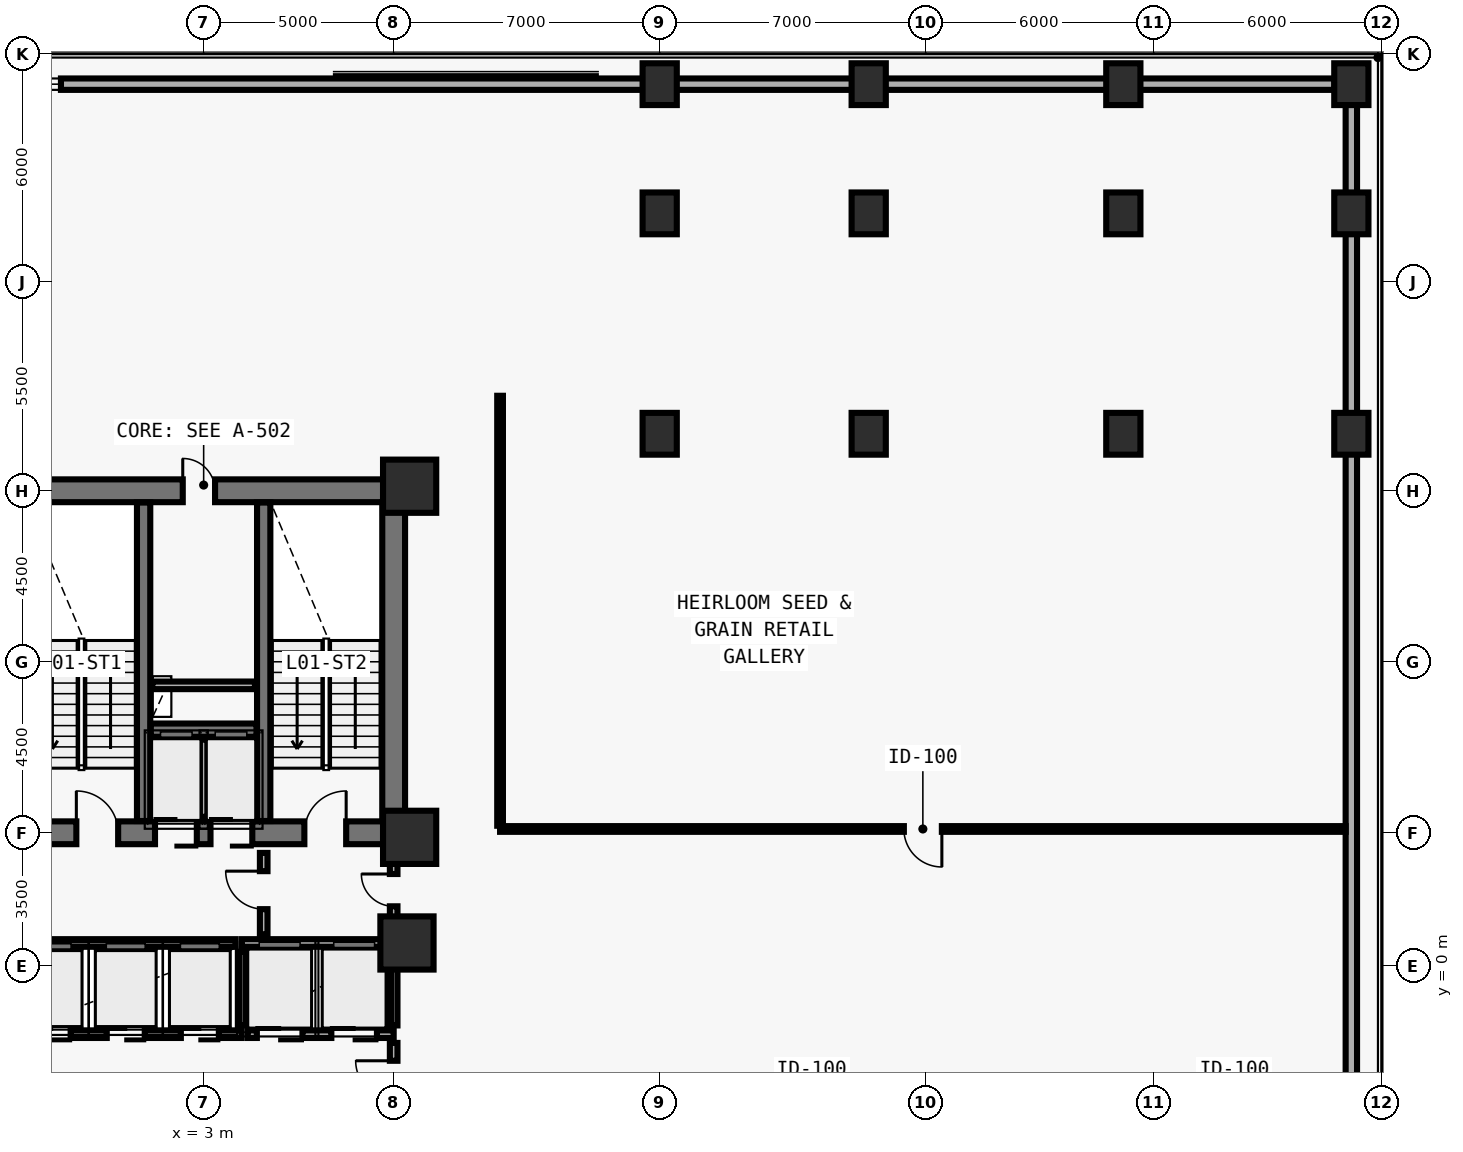
"""IFC4 building model, lengths in metres.
Left out: names, types, materials, properties, quantities, classifications, styles, units other than length and angle.
Written with IfcOpenShell. Run it as: python <this file> out.ifc"""

import sys

from ifc_helpers import new_model, si_unit, direction, frame, frame_2d, origin, origin_2d, place, context, subcontext, project, spatial, rectangle, extrude, element, fill, save


model = new_model("IFC4")
c1 = context("Model", 3, precision=1e-05, world=origin(), true_north=direction((0.0, 1.0)))
c2 = subcontext(c1, "Body", "Model", "MODEL_VIEW")
j1 = project(units=[si_unit("LENGTHUNIT", "METRE"), si_unit("PLANEANGLEUNIT", "RADIAN")], contexts=[c1])
p1 = place(None, origin())
s1 = spatial("IfcSite", under=j1, at=p1, CompositionType="ELEMENT")
p2 = place(p1, origin())
s2 = spatial("IfcBuilding", under=s1, at=p2, CompositionType="ELEMENT")
p3 = place(p2, frame((0.0, 0.0, 4.6)))
s3 = spatial("IfcBuildingStorey", under=s2, at=p3, CompositionType="ELEMENT", Elevation=4.6)
p4 = place(p3, frame((-2.0, 3.5, 0.0), z_axis=(0.0, 0.0, 1.0), x_axis=(1.0, 0.0, 0.0)))
e1 = element("IfcWall", 1, at=p4, inside=s3, PredefinedType="SHEAR", context=c2, shape_type="SweptSolid", body=[
    extrude(rectangle(XDim=10.0, YDim=0.6, at=frame_2d((5.0, 0.0))), origin(), (0.0, 0.0, 1.0), 4.592),
])
p5 = place(p4, frame((1.65, 0.0, 0.0)))
e2 = element("IfcOpeningElement", 2, at=p5, cuts=e1, PredefinedType="OPENING", context=c2, shape_type="SweptSolid", body=[
    extrude(rectangle(XDim=1.1, YDim=2.15, at=frame_2d((0.55, 1.075))), frame((0.0, 0.31, 0.0), z_axis=(0.0, -1.0, 0.0), x_axis=(1.0, 0.0, 0.0)), (0.0, 0.0, 1.0), 0.62),
])
p6 = place(p4, frame((7.65, 0.0, 0.0)))
e3 = element("IfcOpeningElement", 3, at=p6, cuts=e1, PredefinedType="OPENING", context=c2, shape_type="SweptSolid", body=[
    extrude(rectangle(XDim=1.1, YDim=2.15, at=frame_2d((0.55, 1.075))), frame((0.0, 0.31, 0.0), z_axis=(0.0, -1.0, 0.0), x_axis=(1.0, 0.0, 0.0)), (0.0, 0.0, 1.0), 0.62),
])
p7 = place(p4, frame((3.72, 0.0, 0.0)))
e4 = element("IfcOpeningElement", 4, at=p7, cuts=e1, PredefinedType="OPENING", context=c2, shape_type="SweptSolid", body=[
    extrude(rectangle(XDim=1.1, YDim=2.2, at=frame_2d((0.55, 1.1))), frame((0.0, 0.31, 0.0), z_axis=(0.0, -1.0, 0.0), x_axis=(1.0, 0.0, 0.0)), (0.0, 0.0, 1.0), 0.62),
])
p8 = place(p4, frame((5.18, 0.0, 0.0)))
e5 = element("IfcOpeningElement", 5, at=p8, cuts=e1, PredefinedType="OPENING", context=c2, shape_type="SweptSolid", body=[
    extrude(rectangle(XDim=1.1, YDim=2.2, at=frame_2d((0.55, 1.1))), frame((0.0, 0.31, 0.0), z_axis=(0.0, -1.0, 0.0), x_axis=(1.0, 0.0, 0.0)), (0.0, 0.0, 1.0), 0.62),
])
p9 = place(p3, frame((-2.0, 12.5, 0.0), z_axis=(0.0, 0.0, 1.0), x_axis=(1.0, 0.0, 0.0)))
e6 = element("IfcWall", 6, at=p9, inside=s3, PredefinedType="SHEAR", context=c2, shape_type="SweptSolid", body=[
    extrude(rectangle(XDim=10.0, YDim=0.6, at=frame_2d((5.0, 0.0))), origin(), (0.0, 0.0, 1.0), 4.592),
])
p10 = place(p9, frame((4.45, 0.0, 0.0)))
e7 = element("IfcOpeningElement", 7, at=p10, cuts=e6, PredefinedType="OPENING", context=c2, shape_type="SweptSolid", body=[
    extrude(rectangle(XDim=0.85, YDim=2.1, at=frame_2d((0.425, 1.05))), frame((0.0, 0.31, 0.0), z_axis=(0.0, -1.0, 0.0), x_axis=(1.0, 0.0, 0.0)), (0.0, 0.0, 1.0), 0.62),
])
p11 = place(p3, frame((8.0, 3.81, 0.0), z_axis=(0.0, 0.0, 1.0), x_axis=(0.0, 1.0, 0.0)))
e8 = element("IfcWall", 8, at=p11, inside=s3, PredefinedType="SHEAR", context=c2, shape_type="SweptSolid", body=[
    extrude(rectangle(XDim=8.38, YDim=0.6, at=frame_2d((4.19, 0.0))), origin(), (0.0, 0.0, 1.0), 4.592),
])
for number, where, z_axis, x_axis in (
    (9, (1.42, 3.81, 0.0), (0.0, 0.0, 1.0), (0.0, 1.0, 0.0)),
    (10, (4.58, 3.81, 0.0), (0.0, 0.0, 1.0), (0.0, 1.0, 0.0)),
):
    element("IfcWall", number, at=place(p3, frame(where, z_axis=z_axis, x_axis=x_axis)), inside=s3, PredefinedType="SHEAR", context=c2, shape_type="SweptSolid", body=[
        extrude(rectangle(XDim=8.38, YDim=0.35, at=frame_2d((4.19, 0.0))), origin(), (0.0, 0.0, 1.0), 4.592),
    ])
p12 = place(p3, frame((1.61, 6.2, 0.0), z_axis=(0.0, 0.0, 1.0), x_axis=(1.0, 0.0, 0.0)))
e11 = element("IfcWall", 11, at=p12, inside=s3, PredefinedType="SHEAR", context=c2, shape_type="SweptSolid", body=[
    extrude(rectangle(XDim=2.78, YDim=0.35, at=frame_2d((1.39, 0.0))), origin(), (0.0, 0.0, 1.0), 4.592),
])
for number, where, z_axis, x_axis in (
    (12, (8.42, 12.62, 0.0), (0.0, 0.0, 1.0), (1.0, 0.0, 0.0)),
    (13, (8.42, 3.38, 0.0), (0.0, 0.0, 1.0), (1.0, 0.0, 0.0)),
    (14, (8.35, 0.6, 0.0), (0.0, 0.0, 1.0), (1.0, 0.0, 0.0)),
):
    element("IfcColumn", number, at=place(p3, frame(where, z_axis=z_axis, x_axis=x_axis)), inside=s3, PredefinedType="COLUMN", context=c2, shape_type="SweptSolid", body=[
        extrude(rectangle(XDim=1.4, YDim=1.4, at=origin_2d()), origin(), (0.0, 0.0, 1.0), 4.575),
    ])
for number, where, z_axis, x_axis in (
    (15, (15.0, 14.0, 0.0), (0.0, 0.0, 1.0), (1.0, 0.0, 0.0)),
    (16, (15.0, 19.8, 0.0), (0.0, 0.0, 1.0), (1.0, 0.0, 0.0)),
    (17, (15.0, 23.2, 0.0), (0.0, 0.0, 1.0), (1.0, 0.0, 0.0)),
    (18, (20.5, 14.0, 0.0), (0.0, 0.0, 1.0), (1.0, 0.0, 0.0)),
    (19, (20.5, 19.8, 0.0), (0.0, 0.0, 1.0), (1.0, 0.0, 0.0)),
    (20, (20.5, 23.2, 0.0), (0.0, 0.0, 1.0), (1.0, 0.0, 0.0)),
    (21, (27.2, 14.0, 0.0), (0.0, 0.0, 1.0), (1.0, 0.0, 0.0)),
    (22, (27.2, 19.8, 0.0), (0.0, 0.0, 1.0), (1.0, 0.0, 0.0)),
    (23, (27.2, 23.2, 0.0), (0.0, 0.0, 1.0), (1.0, 0.0, 0.0)),
    (24, (33.2, 14.0, 0.0), (0.0, 0.0, 1.0), (1.0, 0.0, 0.0)),
    (25, (33.2, 19.8, 0.0), (0.0, 0.0, 1.0), (1.0, 0.0, 0.0)),
    (26, (33.2, 23.2, 0.0), (0.0, 0.0, 1.0), (1.0, 0.0, 0.0)),
):
    element("IfcColumn", number, at=place(p3, frame(where, z_axis=z_axis, x_axis=x_axis)), inside=s3, PredefinedType="COLUMN", context=c2, shape_type="SweptSolid", body=[
        extrude(rectangle(XDim=0.9, YDim=1.1, at=origin_2d()), origin(), (0.0, 0.0, 1.0), 4.575),
    ])
p13 = place(p3, frame((-32.755, 23.2, 0.0), z_axis=(0.0, 0.0, 1.0), x_axis=(1.0, 0.0, 0.0)))
e27 = element("IfcWall", 27, at=p13, inside=s3, PredefinedType="SOLIDWALL", context=c2, shape_type="SweptSolid", body=[
    extrude(rectangle(XDim=65.51, YDim=0.3, at=frame_2d((32.755, 0.0))), origin(), (0.0, 0.0, 1.0), 3.35),
])
p14 = place(p13, frame((29.0, 0.0, 0.85)))
e28 = element("IfcOpeningElement", 28, at=p14, cuts=e27, PredefinedType="OPENING", context=c2, shape_type="SweptSolid", body=[
    extrude(rectangle(XDim=3.0, YDim=2.1, at=frame_2d((1.5, 1.05))), frame((0.0, 0.16, 0.0), z_axis=(0.0, -1.0, 0.0), x_axis=(1.0, 0.0, 0.0)), (0.0, 0.0, 1.0), 0.32),
])
p15 = place(p3, frame((33.2, 22.655, 0.0), z_axis=(0.0, 0.0, 1.0), x_axis=(0.0, -1.0, 0.0)))
e29 = element("IfcWall", 29, at=p15, inside=s3, PredefinedType="SOLIDWALL", context=c2, shape_type="SweptSolid", body=[
    extrude(rectangle(XDim=45.31, YDim=0.3, at=frame_2d((22.655, 0.0))), origin(), (0.0, 0.0, 1.0), 3.35),
])
p16 = place(p15, frame((29.0, 0.0, 0.85)))
e30 = element("IfcOpeningElement", 30, at=p16, cuts=e29, PredefinedType="OPENING", context=c2, shape_type="SweptSolid", body=[
    extrude(rectangle(XDim=3.0, YDim=2.1, at=frame_2d((1.5, 1.05))), frame((0.0, 0.16, 0.0), z_axis=(0.0, -1.0, 0.0), x_axis=(1.0, 0.0, 0.0)), (0.0, 0.0, 1.0), 0.32),
])
p17 = place(p3, frame((3.0, 3.92, 0.0), z_axis=(0.0, 0.0, 1.0), x_axis=(0.0, 1.0, 0.0)))
e31 = element("IfcWall", 31, at=p17, inside=s3, PredefinedType="SOLIDWALL", context=c2, shape_type="SweptSolid", body=[
    extrude(rectangle(XDim=2.03, YDim=0.2, at=frame_2d((1.015, 0.0))), origin(), (0.0, 0.0, 1.0), 4.28),
])
p18 = place(p3, frame((1.65, 7.38, 0.0), z_axis=(0.0, 0.0, 1.0), x_axis=(1.0, 0.0, 0.0)))
e32 = element("IfcWall", 32, at=p18, inside=s3, PredefinedType="SOLIDWALL", context=c2, shape_type="SweptSolid", body=[
    extrude(rectangle(XDim=2.7, YDim=0.2, at=frame_2d((1.35, 0.0))), origin(), (0.0, 0.0, 1.0), 4.28),
])
p19 = place(p3, frame((4.0, 0.6, 0.0), z_axis=(0.0, 0.0, 1.0), x_axis=(1.0, 0.0, 0.0)))
e33 = element("IfcWall", 33, at=p19, inside=s3, PredefinedType="SOLIDWALL", context=c2, shape_type="SweptSolid", body=[
    extrude(rectangle(XDim=3.88, YDim=0.2, at=frame_2d((1.94, 0.0))), origin(), (0.0, 0.0, 1.0), 3.362),
])
p20 = place(p3, frame((-2.0, -1.8, 0.0), z_axis=(0.0, 0.0, 1.0), x_axis=(1.0, 0.0, 0.0)))
e34 = element("IfcWall", 34, at=p20, inside=s3, PredefinedType="SOLIDWALL", context=c2, shape_type="SweptSolid", body=[
    extrude(rectangle(XDim=6.0, YDim=0.2, at=frame_2d((3.0, 0.0))), origin(), (0.0, 0.0, 1.0), 4.28),
])
p21 = place(p20, frame((0.5, 0.0, 0.0)))
e35 = element("IfcOpeningElement", 35, at=p21, cuts=e34, PredefinedType="OPENING", context=c2, shape_type="SweptSolid", body=[
    extrude(rectangle(XDim=1.0, YDim=2.2, at=frame_2d((0.5, 1.1))), frame((0.0, 0.11, 0.0), z_axis=(0.0, -1.0, 0.0), x_axis=(1.0, 0.0, 0.0)), (0.0, 0.0, 1.0), 0.22),
])
p22 = place(p20, frame((2.45, 0.0, 0.0)))
e36 = element("IfcOpeningElement", 36, at=p22, cuts=e34, PredefinedType="OPENING", context=c2, shape_type="SweptSolid", body=[
    extrude(rectangle(XDim=1.0, YDim=2.2, at=frame_2d((0.5, 1.1))), frame((0.0, 0.11, 0.0), z_axis=(0.0, -1.0, 0.0), x_axis=(1.0, 0.0, 0.0)), (0.0, 0.0, 1.0), 0.22),
])
p23 = place(p20, frame((4.4, 0.0, 0.0)))
e37 = element("IfcOpeningElement", 37, at=p23, cuts=e34, PredefinedType="OPENING", context=c2, shape_type="SweptSolid", body=[
    extrude(rectangle(XDim=1.0, YDim=2.2, at=frame_2d((0.5, 1.1))), frame((0.0, 0.11, 0.0), z_axis=(0.0, -1.0, 0.0), x_axis=(1.0, 0.0, 0.0)), (0.0, 0.0, 1.0), 0.22),
])
p24 = place(p3, frame((4.16, -1.8, 0.0), z_axis=(0.0, 0.0, 1.0), x_axis=(1.0, 0.0, 0.0)))
e38 = element("IfcWall", 38, at=p24, inside=s3, PredefinedType="SOLIDWALL", context=c2, shape_type="SweptSolid", body=[
    extrude(rectangle(XDim=3.84, YDim=0.2, at=frame_2d((1.92, 0.0))), origin(), (0.0, 0.0, 1.0), 4.28),
])
p25 = place(p24, frame((0.24, 0.0, 0.0)))
e39 = element("IfcOpeningElement", 39, at=p25, cuts=e38, PredefinedType="OPENING", context=c2, shape_type="SweptSolid", body=[
    extrude(rectangle(XDim=1.2, YDim=2.25, at=frame_2d((0.6, 1.125))), frame((0.0, 0.11, 0.0), z_axis=(0.0, -1.0, 0.0), x_axis=(1.0, 0.0, 0.0)), (0.0, 0.0, 1.0), 0.22),
])
p26 = place(p24, frame((2.2, 0.0, 0.0)))
e40 = element("IfcOpeningElement", 40, at=p26, cuts=e38, PredefinedType="OPENING", context=c2, shape_type="SweptSolid", body=[
    extrude(rectangle(XDim=1.2, YDim=2.25, at=frame_2d((0.6, 1.125))), frame((0.0, 0.11, 0.0), z_axis=(0.0, -1.0, 0.0), x_axis=(1.0, 0.0, 0.0)), (0.0, 0.0, 1.0), 0.22),
])
p27 = place(p3, frame((4.0, -1.57, 0.0), z_axis=(0.0, 0.0, 1.0), x_axis=(0.0, 1.0, 0.0)))
e41 = element("IfcWall", 41, at=p27, inside=s3, PredefinedType="SOLIDWALL", context=c2, shape_type="SweptSolid", body=[
    extrude(rectangle(XDim=1.94, YDim=0.2, at=frame_2d((0.97, 0.0))), origin(), (0.0, 0.0, 1.0), 4.28),
])
p28 = place(p3, frame((8.0, -1.57, 0.0), z_axis=(0.0, 0.0, 1.0), x_axis=(0.0, 1.0, 0.0)))
e42 = element("IfcWall", 42, at=p28, inside=s3, PredefinedType="SOLIDWALL", context=c2, shape_type="SweptSolid", body=[
    extrude(rectangle(XDim=2.05, YDim=0.2, at=frame_2d((1.025, 0.0))), origin(), (0.0, 0.0, 1.0), 3.362),
])
p29 = place(p3, frame((4.58, 0.83, 0.0), z_axis=(0.0, 0.0, 1.0), x_axis=(0.0, 1.0, 0.0)))
e43 = element("IfcWall", 43, at=p29, inside=s3, PredefinedType="MOVABLE", context=c2, shape_type="SweptSolid", body=[
    extrude(rectangle(XDim=2.14, YDim=0.2, at=frame_2d((1.07, 0.0))), origin(), (0.0, 0.0, 1.0), 4.28),
])
p30 = place(p29, frame((0.66, 0.0, 0.0)))
e44 = element("IfcOpeningElement", 44, at=p30, cuts=e43, PredefinedType="OPENING", context=c2, shape_type="SweptSolid", body=[
    extrude(rectangle(XDim=1.0, YDim=2.1, at=frame_2d((0.5, 1.05))), frame((0.0, 0.11, 0.0), z_axis=(0.0, -1.0, 0.0), x_axis=(1.0, 0.0, 0.0)), (0.0, 0.0, 1.0), 0.22),
])
p31 = place(p3, frame((8.0, 0.72, 0.0), z_axis=(0.0, 0.0, 1.0), x_axis=(0.0, 1.0, 0.0)))
e45 = element("IfcWall", 45, at=p31, inside=s3, PredefinedType="MOVABLE", context=c2, shape_type="SweptSolid", body=[
    extrude(rectangle(XDim=2.25, YDim=0.2, at=frame_2d((1.125, 0.0))), origin(), (0.0, 0.0, 1.0), 3.512),
])
p32 = place(p31, frame((0.845, 0.0, 0.0)))
e46 = element("IfcOpeningElement", 46, at=p32, cuts=e45, PredefinedType="OPENING", context=c2, shape_type="SweptSolid", body=[
    extrude(rectangle(XDim=0.85, YDim=2.1, at=frame_2d((0.425, 1.05))), frame((0.0, 0.11, 0.0), z_axis=(0.0, -1.0, 0.0), x_axis=(1.0, 0.0, 0.0)), (0.0, 0.0, 1.0), 0.22),
])
p33 = place(p3, frame((8.0, -3.97, 0.0), z_axis=(0.0, 0.0, 1.0), x_axis=(0.0, 1.0, 0.0)))
e47 = element("IfcWall", 47, at=p33, inside=s3, PredefinedType="MOVABLE", context=c2, shape_type="SweptSolid", body=[
    extrude(rectangle(XDim=1.94, YDim=0.2, at=frame_2d((0.97, 0.0))), origin(), (0.0, 0.0, 1.0), 3.362),
])
p34 = place(p33, frame((0.47, 0.0, 0.0)))
e48 = element("IfcOpeningElement", 48, at=p34, cuts=e47, PredefinedType="OPENING", context=c2, shape_type="SweptSolid", body=[
    extrude(rectangle(XDim=1.0, YDim=2.1, at=frame_2d((0.5, 1.05))), frame((0.0, 0.11, 0.0), z_axis=(0.0, -1.0, 0.0), x_axis=(1.0, 0.0, 0.0)), (0.0, 0.0, 1.0), 0.22),
])
p35 = place(p3, frame((33.05, 3.6, 0.0), z_axis=(0.0, 0.0, 1.0), x_axis=(-1.0, 0.0, 0.0)))
e49 = element("IfcWall", 49, at=p35, inside=s3, PredefinedType="PARTITIONING", context=c2, shape_type="SweptSolid", body=[
    extrude(rectangle(XDim=22.25, YDim=0.15, at=frame_2d((11.125, 0.0))), origin(), (0.0, 0.0, 1.0), 4.28),
])
p36 = place(p35, frame((10.625, 0.0, 0.0)))
e50 = element("IfcOpeningElement", 50, at=p36, cuts=e49, PredefinedType="OPENING", context=c2, shape_type="SweptSolid", body=[
    extrude(rectangle(XDim=1.0, YDim=2.1, at=frame_2d((0.5, 1.05))), frame((0.0, 0.085, 0.0), z_axis=(0.0, -1.0, 0.0), x_axis=(1.0, 0.0, 0.0)), (0.0, 0.0, 1.0), 0.17),
])
p37 = place(p3, frame((-1.88, 0.6, 0.0), z_axis=(0.0, 0.0, 1.0), x_axis=(1.0, 0.0, 0.0)))
e51 = element("IfcWall", 51, at=p37, inside=s3, PredefinedType="MOVABLE", context=c2, shape_type="SweptSolid", body=[
    extrude(rectangle(XDim=5.72, YDim=0.2, at=frame_2d((2.86, 0.0))), origin(), (0.0, 0.0, 1.0), 3.362),
])
p38 = place(p3, frame((10.8, 3.685, 0.0), z_axis=(0.0, 0.0, 1.0), x_axis=(0.0, 1.0, 0.0)))
e52 = element("IfcWall", 52, at=p38, inside=s3, PredefinedType="PARTITIONING", context=c2, shape_type="SweptSolid", body=[
    extrude(rectangle(XDim=11.315, YDim=0.15, at=frame_2d((5.657, 0.0))), origin(), (0.0, 0.0, 1.0), 4.28),
])
p39 = place(p14, origin())
e53 = element("IfcWindow", 53, at=p39, inside=s3, PartitioningType="SINGLE_PANEL", PredefinedType="WINDOW", context=c2, shape_type="SweptSolid", body=[
    extrude(rectangle(XDim=3.0, YDim=2.1, at=frame_2d((1.5, 1.05))), frame((0.0, 0.03, 0.0), z_axis=(0.0, -1.0, 0.0), x_axis=(1.0, 0.0, 0.0)), (0.0, 0.0, 1.0), 0.06),
])
fill(e28, e53)
p40 = place(p5, origin())
e54 = element("IfcDoor", 54, at=p40, inside=s3, OperationType="SINGLE_SWING_LEFT", PredefinedType="DOOR", context=c2, shape_type="SweptSolid", body=[
    extrude(rectangle(XDim=1.1, YDim=2.15, at=frame_2d((0.55, 1.075))), frame((0.0, 0.025, 0.0), z_axis=(0.0, -1.0, 0.0), x_axis=(1.0, 0.0, 0.0)), (0.0, 0.0, 1.0), 0.05),
])
fill(e2, e54)
p41 = place(p6, origin())
e55 = element("IfcDoor", 55, at=p41, inside=s3, OperationType="SINGLE_SWING_RIGHT", PredefinedType="DOOR", context=c2, shape_type="SweptSolid", body=[
    extrude(rectangle(XDim=1.1, YDim=2.15, at=frame_2d((0.55, 1.075))), frame((0.0, 0.025, 0.0), z_axis=(0.0, -1.0, 0.0), x_axis=(1.0, 0.0, 0.0)), (0.0, 0.0, 1.0), 0.05),
])
fill(e3, e55)
p42 = place(p7, origin())
e56 = element("IfcDoor", 56, at=p42, inside=s3, OperationType="DOUBLE_DOOR_SLIDING", PredefinedType="DOOR", context=c2, shape_type="SweptSolid", body=[
    extrude(rectangle(XDim=1.1, YDim=2.2, at=frame_2d((0.55, 1.1))), frame((0.0, 0.025, 0.0), z_axis=(0.0, -1.0, 0.0), x_axis=(1.0, 0.0, 0.0)), (0.0, 0.0, 1.0), 0.05),
])
fill(e4, e56)
p43 = place(p8, origin())
e57 = element("IfcDoor", 57, at=p43, inside=s3, OperationType="DOUBLE_DOOR_SLIDING", PredefinedType="DOOR", context=c2, shape_type="SweptSolid", body=[
    extrude(rectangle(XDim=1.1, YDim=2.2, at=frame_2d((0.55, 1.1))), frame((0.0, 0.025, 0.0), z_axis=(0.0, -1.0, 0.0), x_axis=(1.0, 0.0, 0.0)), (0.0, 0.0, 1.0), 0.05),
])
fill(e5, e57)
p44 = place(p10, origin())
e58 = element("IfcDoor", 58, at=p44, inside=s3, OperationType="SINGLE_SWING_LEFT", PredefinedType="DOOR", context=c2, shape_type="SweptSolid", body=[
    extrude(rectangle(XDim=0.85, YDim=2.1, at=frame_2d((0.425, 1.05))), frame((0.0, 0.025, 0.0), z_axis=(0.0, -1.0, 0.0), x_axis=(1.0, 0.0, 0.0)), (0.0, 0.0, 1.0), 0.05),
])
fill(e7, e58)
p45 = place(p30, origin())
e59 = element("IfcDoor", 59, at=p45, inside=s3, OperationType="SINGLE_SWING_RIGHT", PredefinedType="DOOR", context=c2, shape_type="SweptSolid", body=[
    extrude(rectangle(XDim=1.0, YDim=2.1, at=frame_2d((0.5, 1.05))), frame((0.0, 0.025, 0.0), z_axis=(0.0, -1.0, 0.0), x_axis=(1.0, 0.0, 0.0)), (0.0, 0.0, 1.0), 0.05),
])
fill(e44, e59)
p46 = place(p32, origin())
e60 = element("IfcDoor", 60, at=p46, inside=s3, OperationType="SINGLE_SWING_RIGHT", PredefinedType="DOOR", context=c2, shape_type="SweptSolid", body=[
    extrude(rectangle(XDim=0.85, YDim=2.1, at=frame_2d((0.425, 1.05))), frame((0.0, 0.025, 0.0), z_axis=(0.0, -1.0, 0.0), x_axis=(1.0, 0.0, 0.0)), (0.0, 0.0, 1.0), 0.05),
])
fill(e46, e60)
p47 = place(p34, origin())
e61 = element("IfcDoor", 61, at=p47, inside=s3, OperationType="SINGLE_SWING_RIGHT", PredefinedType="DOOR", context=c2, shape_type="SweptSolid", body=[
    extrude(rectangle(XDim=1.0, YDim=2.1, at=frame_2d((0.5, 1.05))), frame((0.0, 0.025, 0.0), z_axis=(0.0, -1.0, 0.0), x_axis=(1.0, 0.0, 0.0)), (0.0, 0.0, 1.0), 0.05),
])
fill(e48, e61)
p48 = place(p36, origin())
e62 = element("IfcDoor", 62, at=p48, inside=s3, OperationType="SINGLE_SWING_LEFT", PredefinedType="DOOR", context=c2, shape_type="SweptSolid", body=[
    extrude(rectangle(XDim=1.0, YDim=2.1, at=frame_2d((0.5, 1.05))), frame((0.0, 0.025, 0.0), z_axis=(0.0, -1.0, 0.0), x_axis=(1.0, 0.0, 0.0)), (0.0, 0.0, 1.0), 0.05),
])
fill(e50, e62)
p49 = place(p21, origin())
e63 = element("IfcDoor", 63, at=p49, inside=s3, OperationType="DOUBLE_DOOR_SLIDING", PredefinedType="DOOR", context=c2, shape_type="SweptSolid", body=[
    extrude(rectangle(XDim=1.0, YDim=2.2, at=frame_2d((0.5, 1.1))), frame((0.0, 0.025, 0.0), z_axis=(0.0, -1.0, 0.0), x_axis=(1.0, 0.0, 0.0)), (0.0, 0.0, 1.0), 0.05),
])
fill(e35, e63)
p50 = place(p22, origin())
e64 = element("IfcDoor", 64, at=p50, inside=s3, OperationType="DOUBLE_DOOR_SLIDING", PredefinedType="DOOR", context=c2, shape_type="SweptSolid", body=[
    extrude(rectangle(XDim=1.0, YDim=2.2, at=frame_2d((0.5, 1.1))), frame((0.0, 0.025, 0.0), z_axis=(0.0, -1.0, 0.0), x_axis=(1.0, 0.0, 0.0)), (0.0, 0.0, 1.0), 0.05),
])
fill(e36, e64)
p51 = place(p23, origin())
e65 = element("IfcDoor", 65, at=p51, inside=s3, OperationType="DOUBLE_DOOR_SLIDING", PredefinedType="DOOR", context=c2, shape_type="SweptSolid", body=[
    extrude(rectangle(XDim=1.0, YDim=2.2, at=frame_2d((0.5, 1.1))), frame((0.0, 0.025, 0.0), z_axis=(0.0, -1.0, 0.0), x_axis=(1.0, 0.0, 0.0)), (0.0, 0.0, 1.0), 0.05),
])
fill(e37, e65)
p52 = place(p25, origin())
e66 = element("IfcDoor", 66, at=p52, inside=s3, OperationType="DOUBLE_DOOR_SLIDING", PredefinedType="DOOR", context=c2, shape_type="SweptSolid", body=[
    extrude(rectangle(XDim=1.2, YDim=2.25, at=frame_2d((0.6, 1.125))), frame((0.0, 0.025, 0.0), z_axis=(0.0, -1.0, 0.0), x_axis=(1.0, 0.0, 0.0)), (0.0, 0.0, 1.0), 0.05),
])
fill(e39, e66)
p53 = place(p26, origin())
e67 = element("IfcDoor", 67, at=p53, inside=s3, OperationType="DOUBLE_DOOR_SLIDING", PredefinedType="DOOR", context=c2, shape_type="SweptSolid", body=[
    extrude(rectangle(XDim=1.2, YDim=2.25, at=frame_2d((0.6, 1.125))), frame((0.0, 0.025, 0.0), z_axis=(0.0, -1.0, 0.0), x_axis=(1.0, 0.0, 0.0)), (0.0, 0.0, 1.0), 0.05),
])
fill(e40, e67)
save(model, sys.argv[1])
